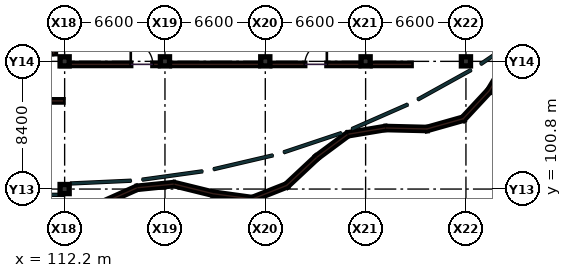
"""IFC4 building model, lengths in metres.
Left out: names, types, materials, properties, quantities, classifications, styles, units other than length and angle.
Written with IfcOpenShell. Run it as: python <this file> out.ifc"""

import sys

from ifc_helpers import new_model, si_unit, direction, frame, frame_2d, origin, origin_2d, place, context, subcontext, project, spatial, rectangle, extrude, element, fill, save


model = new_model("IFC4")
c1 = context("Model", 3, precision=1e-05, world=origin(), true_north=direction((0.0, 1.0)))
c2 = subcontext(c1, "Body", "Model", "MODEL_VIEW")
j1 = project(units=[si_unit("LENGTHUNIT", "METRE"), si_unit("PLANEANGLEUNIT", "RADIAN")], contexts=[c1])
p1 = place(None, origin())
s1 = spatial("IfcSite", under=j1, at=p1, CompositionType="ELEMENT")
p2 = place(p1, origin())
s2 = spatial("IfcBuilding", under=s1, at=p2, CompositionType="ELEMENT")
p3 = place(p2, frame((0.0, 0.0, 14.4)))
s3 = spatial("IfcBuildingStorey", under=s2, at=p3, CompositionType="ELEMENT", Elevation=14.4)
for number, where, z_axis, x_axis in (
    (1, (112.2, 100.8, 0.0), (0.0, 0.0, 1.0), (1.0, 0.0, 0.0)),
    (2, (112.2, 109.2, 0.0), (0.0, 0.0, 1.0), (1.0, 0.0, 0.0)),
    (3, (118.8, 109.2, 0.0), (0.0, 0.0, 1.0), (1.0, 0.0, 0.0)),
    (4, (125.4, 109.2, 0.0), (0.0, 0.0, 1.0), (1.0, 0.0, 0.0)),
    (5, (132.0, 109.2, 0.0), (0.0, 0.0, 1.0), (1.0, 0.0, 0.0)),
    (6, (138.6, 109.2, 0.0), (0.0, 0.0, 1.0), (1.0, 0.0, 0.0)),
):
    element("IfcColumn", number, at=place(p3, frame(where, z_axis=z_axis, x_axis=x_axis)), inside=s3, PredefinedType="COLUMN", context=c2, shape_type="SweptSolid", body=[
        extrude(rectangle(XDim=0.6, YDim=0.6, at=origin_2d()), origin(), (0.0, 0.0, 1.0), 4.2),
    ])
p4 = place(p3, frame((112.0, 109.0, 0.0), z_axis=(0.0, 0.0, 1.0), x_axis=(1.0, 0.0, 0.0)))
e7 = element("IfcWall", 7, at=p4, inside=s3, PredefinedType="PARTITIONING", context=c2, shape_type="SweptSolid", body=[
    extrude(rectangle(XDim=6.35, YDim=0.16, at=frame_2d((3.175, 0.0))), origin(), (0.0, 0.0, 1.0), 3.175),
])
p5 = place(p4, frame((4.55, 0.0, 0.0)))
e8 = element("IfcOpeningElement", 8, at=p5, cuts=e7, PredefinedType="OPENING", context=c2, shape_type="SweptSolid", body=[
    extrude(rectangle(XDim=1.45, YDim=2.25, at=frame_2d((0.725, 1.125))), frame((0.0, 0.09, 0.0), z_axis=(0.0, -1.0, 0.0), x_axis=(1.0, 0.0, 0.0)), (0.0, 0.0, 1.0), 0.18),
])
p6 = place(p3, frame((119.25, 109.0, 0.0), z_axis=(0.0, 0.0, 1.0), x_axis=(1.0, 0.0, 0.0)))
e9 = element("IfcWall", 9, at=p6, inside=s3, PredefinedType="PARTITIONING", context=c2, shape_type="SweptSolid", body=[
    extrude(rectangle(XDim=5.7, YDim=0.16, at=frame_2d((2.85, 0.0))), origin(), (0.0, 0.0, 1.0), 3.175),
])
p7 = place(p3, frame((125.85, 109.0, 0.0), z_axis=(0.0, 0.0, 1.0), x_axis=(1.0, 0.0, 0.0)))
e10 = element("IfcWall", 10, at=p7, inside=s3, PredefinedType="PARTITIONING", context=c2, shape_type="SweptSolid", body=[
    extrude(rectangle(XDim=5.7, YDim=0.16, at=frame_2d((2.85, 0.0))), origin(), (0.0, 0.0, 1.0), 3.175),
])
p8 = place(p7, frame((2.15, 0.0, 0.0)))
e11 = element("IfcOpeningElement", 11, at=p8, cuts=e10, PredefinedType="OPENING", context=c2, shape_type="SweptSolid", body=[
    extrude(rectangle(XDim=1.45, YDim=2.25, at=frame_2d((0.725, 1.125))), frame((0.0, 0.09, 0.0), z_axis=(0.0, -1.0, 0.0), x_axis=(1.0, 0.0, 0.0)), (0.0, 0.0, 1.0), 0.18),
])
p9 = place(p3, frame((132.45, 109.0, 0.0), z_axis=(0.0, 0.0, 1.0), x_axis=(1.0, 0.0, 0.0)))
e12 = element("IfcWall", 12, at=p9, inside=s3, PredefinedType="PARTITIONING", context=c2, shape_type="SweptSolid", body=[
    extrude(rectangle(XDim=2.55, YDim=0.16, at=frame_2d((1.275, 0.0))), origin(), (0.0, 0.0, 1.0), 3.175),
])
p10 = place(p3, frame((99.2, 106.6, 0.0), z_axis=(0.0, 0.0, 1.0), x_axis=(1.0, 0.0, 0.0)))
e13 = element("IfcWall", 13, at=p10, inside=s3, PredefinedType="PARTITIONING", context=c2, shape_type="SweptSolid", body=[
    extrude(rectangle(XDim=12.9, YDim=0.16, at=frame_2d((6.45, 0.0))), origin(), (0.0, 0.0, 1.0), 3.19),
])
p11 = place(p10, frame((4.2, 0.0, 0.0)))
e14 = element("IfcOpeningElement", 14, at=p11, cuts=e13, PredefinedType="OPENING", context=c2, shape_type="SweptSolid", body=[
    extrude(rectangle(XDim=1.05, YDim=2.15, at=frame_2d((0.525, 1.075))), frame((0.0, 0.09, 0.0), z_axis=(0.0, -1.0, 0.0), x_axis=(1.0, 0.0, 0.0)), (0.0, 0.0, 1.0), 0.18),
])
p12 = place(p3, frame((114.585, 99.82, 0.0), z_axis=(0.0, 0.0, 1.0), x_axis=(0.91294882956, 0.408074055294, 0.0)))
e15 = element("IfcWall", 15, at=p12, inside=s3, PredefinedType="SOLIDWALL", context=c2, shape_type="SweptSolid", body=[
    extrude(rectangle(XDim=2.585, YDim=0.22, at=frame_2d((1.292, 0.0))), origin(), (0.0, 0.0, 1.0), 1.45),
])
p13 = place(p3, frame((116.985, 100.885, 0.0), z_axis=(0.0, 0.0, 1.0), x_axis=(0.994995843121, 0.099916325854, 0.0)))
e16 = element("IfcWall", 16, at=p13, inside=s3, PredefinedType="SOLIDWALL", context=c2, shape_type="SweptSolid", body=[
    extrude(rectangle(XDim=2.402, YDim=0.22, at=frame_2d((1.201, 0.0))), origin(), (0.0, 0.0, 1.0), 1.45),
])
p14 = place(p3, frame((119.425, 101.12, 0.0), z_axis=(0.0, 0.0, 1.0), x_axis=(0.971018515924, -0.239004271371, 0.0)))
e17 = element("IfcWall", 17, at=p14, inside=s3, PredefinedType="SOLIDWALL", context=c2, shape_type="SweptSolid", body=[
    extrude(rectangle(XDim=2.636, YDim=0.22, at=frame_2d((1.318, 0.0))), origin(), (0.0, 0.0, 1.0), 1.45),
])
p15 = place(p3, frame((121.97, 100.495, 0.0), z_axis=(0.0, 0.0, 1.0), x_axis=(0.99054500618, -0.137188158133, 0.0)))
e18 = element("IfcWall", 18, at=p15, inside=s3, PredefinedType="SOLIDWALL", context=c2, shape_type="SweptSolid", body=[
    extrude(rectangle(XDim=2.625, YDim=0.22, at=frame_2d((1.312, 0.0))), origin(), (0.0, 0.0, 1.0), 1.45),
])
p16 = place(p3, frame((124.5, 100.125, 0.0), z_axis=(0.0, 0.0, 1.0), x_axis=(0.930134198421, 0.367219788312, 0.0)))
e19 = element("IfcWall", 19, at=p16, inside=s3, PredefinedType="SOLIDWALL", context=c2, shape_type="SweptSolid", body=[
    extrude(rectangle(XDim=2.505, YDim=0.22, at=frame_2d((1.252, 0.0))), origin(), (0.0, 0.0, 1.0), 1.45),
])
p17 = place(p3, frame((126.785, 101.015, 0.0), z_axis=(0.0, 0.0, 1.0), x_axis=(0.730545406859, 0.682864121563, 0.0)))
e20 = element("IfcWall", 20, at=p17, inside=s3, PredefinedType="SOLIDWALL", context=c2, shape_type="SweptSolid", body=[
    extrude(rectangle(XDim=2.724, YDim=0.22, at=frame_2d((1.362, 0.0))), origin(), (0.0, 0.0, 1.0), 1.45),
])
p18 = place(p3, frame((128.785, 102.89, 0.0), z_axis=(0.0, 0.0, 1.0), x_axis=(0.803784295938, 0.594920839778, 0.0)))
e21 = element("IfcWall", 21, at=p18, inside=s3, PredefinedType="SOLIDWALL", context=c2, shape_type="SweptSolid", body=[
    extrude(rectangle(XDim=2.513, YDim=0.22, at=frame_2d((1.257, 0.0))), origin(), (0.0, 0.0, 1.0), 1.45),
])
p19 = place(p3, frame((130.865, 104.41, 0.0), z_axis=(0.0, 0.0, 1.0), x_axis=(0.986447332153, 0.164078215765, 0.0)))
e22 = element("IfcWall", 22, at=p19, inside=s3, PredefinedType="SOLIDWALL", context=c2, shape_type="SweptSolid", body=[
    extrude(rectangle(XDim=2.469, YDim=0.22, at=frame_2d((1.234, 0.0))), origin(), (0.0, 0.0, 1.0), 1.45),
])
p20 = place(p3, frame((133.33, 104.815, 0.0), z_axis=(0.0, 0.0, 1.0), x_axis=(0.999716115228, -0.023826224053, 0.0)))
e23 = element("IfcWall", 23, at=p20, inside=s3, PredefinedType="SOLIDWALL", context=c2, shape_type="SweptSolid", body=[
    extrude(rectangle(XDim=2.726, YDim=0.22, at=frame_2d((1.363, 0.0))), origin(), (0.0, 0.0, 1.0), 1.45),
])
p21 = place(p3, frame((136.01, 104.745, 0.0), z_axis=(0.0, 0.0, 1.0), x_axis=(0.962268855945, 0.272100438953, 0.0)))
e24 = element("IfcWall", 24, at=p21, inside=s3, PredefinedType="SOLIDWALL", context=c2, shape_type="SweptSolid", body=[
    extrude(rectangle(XDim=2.536, YDim=0.22, at=frame_2d((1.268, 0.0))), origin(), (0.0, 0.0, 1.0), 1.45),
])
p22 = place(p3, frame((138.39, 105.395, 0.0), z_axis=(0.0, 0.0, 1.0), x_axis=(0.681585677602, 0.731738316673, 0.0)))
e25 = element("IfcWall", 25, at=p22, inside=s3, PredefinedType="SOLIDWALL", context=c2, shape_type="SweptSolid", body=[
    extrude(rectangle(XDim=2.59, YDim=0.22, at=frame_2d((1.295, 0.0))), origin(), (0.0, 0.0, 1.0), 1.45),
])
p23 = place(p3, frame((140.135, 107.265, 0.0), z_axis=(0.0, 0.0, 1.0), x_axis=(0.515304519221, 0.857007148436, 0.0)))
e26 = element("IfcWall", 26, at=p23, inside=s3, PredefinedType="SOLIDWALL", context=c2, shape_type="SweptSolid", body=[
    extrude(rectangle(XDim=2.707, YDim=0.22, at=frame_2d((1.354, 0.0))), origin(), (0.0, 0.0, 1.0), 1.45),
])
p24 = place(p3, frame((111.475, 109.7, 0.0), z_axis=(0.0, 0.0, 1.0), x_axis=(0.0, 1.0, 0.0)))
e27 = element("IfcWall", 27, at=p24, inside=s3, PredefinedType="SHEAR", context=c2, shape_type="SweptSolid", body=[
    extrude(rectangle(XDim=3.2, YDim=0.25, at=frame_2d((1.6, 0.0))), origin(), (0.0, 0.0, 1.0), 3.94),
])
p25 = place(p5, origin())
e28 = element("IfcDoor", 28, at=p25, inside=s3, OperationType="SINGLE_SWING_LEFT", PredefinedType="DOOR", context=c2, shape_type="SweptSolid", body=[
    extrude(rectangle(XDim=1.45, YDim=2.25, at=frame_2d((0.725, 1.125))), frame((0.0, 0.025, 0.0), z_axis=(0.0, -1.0, 0.0), x_axis=(1.0, 0.0, 0.0)), (0.0, 0.0, 1.0), 0.05),
])
fill(e8, e28)
p26 = place(p8, origin())
e29 = element("IfcDoor", 29, at=p26, inside=s3, OperationType="SINGLE_SWING_RIGHT", PredefinedType="DOOR", context=c2, shape_type="SweptSolid", body=[
    extrude(rectangle(XDim=1.45, YDim=2.25, at=frame_2d((0.725, 1.125))), frame((0.0, 0.025, 0.0), z_axis=(0.0, -1.0, 0.0), x_axis=(1.0, 0.0, 0.0)), (0.0, 0.0, 1.0), 0.05),
])
fill(e11, e29)
save(model, sys.argv[1])
